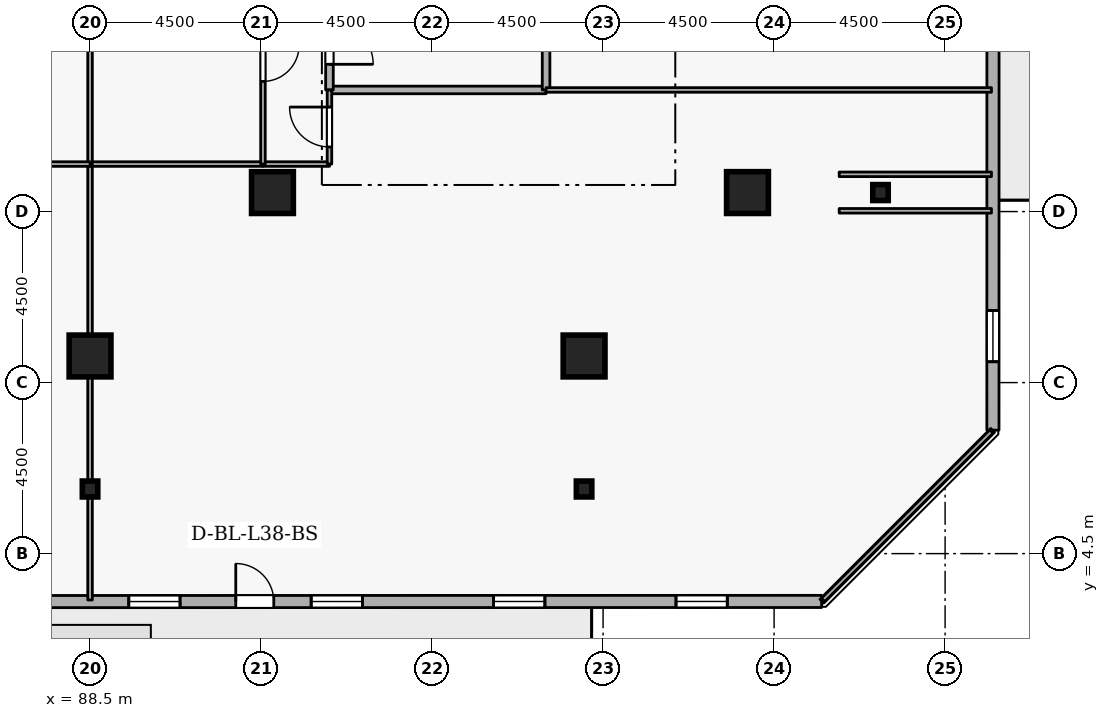
"""IFC4 building model, lengths in metres.
Left out: names, types, materials, properties, quantities, classifications, styles, units other than length and angle.
Written with IfcOpenShell. Run it as: python <this file> out.ifc"""

import sys

from ifc_helpers import new_model, si_unit, direction, frame, frame_2d, origin, origin_2d, place, context, subcontext, project, spatial, rectangle, i_section, extrude, element, fill, save


model = new_model("IFC4")
c1 = context("Model", 3, precision=1e-05, world=origin(), true_north=direction((0.0, 1.0)))
c2 = subcontext(c1, "Body", "Model", "MODEL_VIEW")
j1 = project(units=[si_unit("LENGTHUNIT", "METRE"), si_unit("PLANEANGLEUNIT", "RADIAN")], contexts=[c1])
p1 = place(None, origin())
s1 = spatial("IfcSite", under=j1, at=p1, CompositionType="ELEMENT")
p2 = place(p1, origin())
s2 = spatial("IfcBuilding", under=s1, at=p2, CompositionType="ELEMENT")
p3 = place(p2, frame((0.0, 0.0, 145.5)))
s3 = spatial("IfcBuildingStorey", under=s2, at=p3, CompositionType="ELEMENT", Elevation=145.5)
for number, where, z_axis, x_axis in (
    (1, (105.8, 14.0, 0.0), (0.0, 0.0, 1.0), (1.0, 0.0, 0.0)),
    (2, (101.5, 9.7, 0.0), (0.0, 0.0, 1.0), (1.0, 0.0, 0.0)),
    (3, (88.5, 9.7, 0.0), (0.0, 0.0, 1.0), (1.0, 0.0, 0.0)),
    (4, (93.3, 14.0, 0.0), (0.0, 0.0, 1.0), (1.0, 0.0, 0.0)),
):
    element("IfcColumn", number, at=place(p3, frame(where, z_axis=z_axis, x_axis=x_axis)), inside=s3, PredefinedType="COLUMN", context=c2, shape_type="SweptSolid", body=[
        extrude(rectangle(XDim=1.1, YDim=1.1, at=origin_2d()), origin(), (0.0, 0.0, 1.0), 3.6),
    ])
for number, where, z_axis, x_axis in (
    (5, (109.3, 14.0, 0.0), (0.0, 0.0, 1.0), (1.0, 0.0, 0.0)),
    (6, (101.5, 6.2, 0.0), (0.0, 0.0, 1.0), (1.0, 0.0, 0.0)),
    (7, (88.5, 6.2, 0.0), (0.0, 0.0, 1.0), (1.0, 0.0, 0.0)),
):
    element("IfcColumn", number, at=place(p3, frame(where, z_axis=z_axis, x_axis=x_axis)), inside=s3, PredefinedType="COLUMN", context=c2, shape_type="SweptSolid", body=[
        extrude(i_section(OverallWidth=0.407, OverallDepth=0.419, WebThickness=0.031, FlangeThickness=0.049, FilletRadius=0.015, at=origin_2d()), origin(), (0.0, 0.0, 1.0), 3.6),
    ])
p4 = place(p3, frame((73.319, 3.235, 0.0), z_axis=(0.0, 0.0, 1.0), x_axis=(0.999999983007, 0.000184351399, 0.0)))
e8 = element("IfcWall", 8, at=p4, inside=s3, PredefinedType="STANDARD", context=c2, shape_type="SweptSolid", body=[
    extrude(rectangle(XDim=34.432, YDim=0.32, at=frame_2d((17.216, 0.0))), origin(), (0.0, 0.0, 1.0), 2.22),
])
p5 = place(p4, frame((19.016, 0.0, 0.0)))
e9 = element("IfcOpeningElement", 9, at=p5, cuts=e8, PredefinedType="OPENING", context=c2, shape_type="SweptSolid", body=[
    extrude(rectangle(XDim=1.0, YDim=2.08, at=frame_2d((0.5, 1.04))), frame((0.0, 0.17, 0.0), z_axis=(0.0, -1.0, 0.0), x_axis=(1.0, 0.0, 0.0)), (0.0, 0.0, 1.0), 0.34),
])
p6 = place(p4, frame((1.8, 0.0, 0.72)))
e10 = element("IfcOpeningElement", 10, at=p6, cuts=e8, PredefinedType="OPENING", context=c2, shape_type="SweptSolid", body=[
    extrude(rectangle(XDim=1.35, YDim=1.05, at=frame_2d((0.675, 0.525))), frame((0.0, 0.17, 0.0), z_axis=(0.0, -1.0, 0.0), x_axis=(1.0, 0.0, 0.0)), (0.0, 0.0, 1.0), 0.34),
])
p7 = place(p4, frame((6.6, 0.0, 0.72)))
e11 = element("IfcOpeningElement", 11, at=p7, cuts=e8, PredefinedType="OPENING", context=c2, shape_type="SweptSolid", body=[
    extrude(rectangle(XDim=1.35, YDim=1.05, at=frame_2d((0.675, 0.525))), frame((0.0, 0.17, 0.0), z_axis=(0.0, -1.0, 0.0), x_axis=(1.0, 0.0, 0.0)), (0.0, 0.0, 1.0), 0.34),
])
p8 = place(p4, frame((11.4, 0.0, 0.72)))
e12 = element("IfcOpeningElement", 12, at=p8, cuts=e8, PredefinedType="OPENING", context=c2, shape_type="SweptSolid", body=[
    extrude(rectangle(XDim=1.35, YDim=1.05, at=frame_2d((0.675, 0.525))), frame((0.0, 0.17, 0.0), z_axis=(0.0, -1.0, 0.0), x_axis=(1.0, 0.0, 0.0)), (0.0, 0.0, 1.0), 0.34),
])
p9 = place(p4, frame((16.2, 0.0, 0.72)))
e13 = element("IfcOpeningElement", 13, at=p9, cuts=e8, PredefinedType="OPENING", context=c2, shape_type="SweptSolid", body=[
    extrude(rectangle(XDim=1.35, YDim=1.05, at=frame_2d((0.675, 0.525))), frame((0.0, 0.17, 0.0), z_axis=(0.0, -1.0, 0.0), x_axis=(1.0, 0.0, 0.0)), (0.0, 0.0, 1.0), 0.34),
])
p10 = place(p4, frame((21.0, 0.0, 0.72)))
e14 = element("IfcOpeningElement", 14, at=p10, cuts=e8, PredefinedType="OPENING", context=c2, shape_type="SweptSolid", body=[
    extrude(rectangle(XDim=1.35, YDim=1.05, at=frame_2d((0.675, 0.525))), frame((0.0, 0.17, 0.0), z_axis=(0.0, -1.0, 0.0), x_axis=(1.0, 0.0, 0.0)), (0.0, 0.0, 1.0), 0.34),
])
p11 = place(p4, frame((25.8, 0.0, 0.72)))
e15 = element("IfcOpeningElement", 15, at=p11, cuts=e8, PredefinedType="OPENING", context=c2, shape_type="SweptSolid", body=[
    extrude(rectangle(XDim=1.35, YDim=1.05, at=frame_2d((0.675, 0.525))), frame((0.0, 0.17, 0.0), z_axis=(0.0, -1.0, 0.0), x_axis=(1.0, 0.0, 0.0)), (0.0, 0.0, 1.0), 0.34),
])
p12 = place(p4, frame((30.6, 0.0, 0.72)))
e16 = element("IfcOpeningElement", 16, at=p12, cuts=e8, PredefinedType="OPENING", context=c2, shape_type="SweptSolid", body=[
    extrude(rectangle(XDim=1.35, YDim=1.05, at=frame_2d((0.675, 0.525))), frame((0.0, 0.17, 0.0), z_axis=(0.0, -1.0, 0.0), x_axis=(1.0, 0.0, 0.0)), (0.0, 0.0, 1.0), 0.34),
])
p13 = place(p3, frame((112.258, 7.749, 0.0), z_axis=(0.0, 0.0, 1.0), x_axis=(0.000184351399, 0.999999983007, 0.0)))
e17 = element("IfcWall", 17, at=p13, inside=s3, PredefinedType="STANDARD", context=c2, shape_type="SweptSolid", body=[
    extrude(rectangle(XDim=34.432, YDim=0.32, at=frame_2d((17.216, 0.0))), origin(), (0.0, 0.0, 1.0), 2.22),
])
p14 = place(p13, frame((27.566, 0.0, 0.0)))
e18 = element("IfcOpeningElement", 18, at=p14, cuts=e17, PredefinedType="OPENING", context=c2, shape_type="SweptSolid", body=[
    extrude(rectangle(XDim=1.0, YDim=2.08, at=frame_2d((0.5, 1.04))), frame((0.0, 0.17, 0.0), z_axis=(0.0, -1.0, 0.0), x_axis=(1.0, 0.0, 0.0)), (0.0, 0.0, 1.0), 0.34),
])
p15 = place(p13, frame((1.8, 0.0, 0.72)))
e19 = element("IfcOpeningElement", 19, at=p15, cuts=e17, PredefinedType="OPENING", context=c2, shape_type="SweptSolid", body=[
    extrude(rectangle(XDim=1.35, YDim=1.05, at=frame_2d((0.675, 0.525))), frame((0.0, 0.17, 0.0), z_axis=(0.0, -1.0, 0.0), x_axis=(1.0, 0.0, 0.0)), (0.0, 0.0, 1.0), 0.34),
])
p16 = place(p13, frame((11.4, 0.0, 0.72)))
e20 = element("IfcOpeningElement", 20, at=p16, cuts=e17, PredefinedType="OPENING", context=c2, shape_type="SweptSolid", body=[
    extrude(rectangle(XDim=1.35, YDim=1.05, at=frame_2d((0.675, 0.525))), frame((0.0, 0.17, 0.0), z_axis=(0.0, -1.0, 0.0), x_axis=(1.0, 0.0, 0.0)), (0.0, 0.0, 1.0), 0.34),
])
p17 = place(p13, frame((16.2, 0.0, 0.72)))
e21 = element("IfcOpeningElement", 21, at=p17, cuts=e17, PredefinedType="OPENING", context=c2, shape_type="SweptSolid", body=[
    extrude(rectangle(XDim=1.35, YDim=1.05, at=frame_2d((0.675, 0.525))), frame((0.0, 0.17, 0.0), z_axis=(0.0, -1.0, 0.0), x_axis=(1.0, 0.0, 0.0)), (0.0, 0.0, 1.0), 0.34),
])
p18 = place(p13, frame((21.0, 0.0, 0.72)))
e22 = element("IfcOpeningElement", 22, at=p18, cuts=e17, PredefinedType="OPENING", context=c2, shape_type="SweptSolid", body=[
    extrude(rectangle(XDim=1.35, YDim=1.05, at=frame_2d((0.675, 0.525))), frame((0.0, 0.17, 0.0), z_axis=(0.0, -1.0, 0.0), x_axis=(1.0, 0.0, 0.0)), (0.0, 0.0, 1.0), 0.34),
])
p19 = place(p3, frame((94.8, 16.7, 0.0), z_axis=(0.0, 0.0, 1.0), x_axis=(1.0, 0.0, 0.0)))
e23 = element("IfcWall", 23, at=p19, inside=s3, PredefinedType="STANDARD", context=c2, shape_type="SweptSolid", body=[
    extrude(rectangle(XDim=5.7, YDim=0.2, at=frame_2d((2.85, 0.0))), origin(), (0.0, 0.0, 1.0), 3.3),
])
p20 = place(p3, frame((100.5, 16.7, 0.0), z_axis=(0.0, 0.0, 1.0), x_axis=(0.0, 1.0, 0.0)))
e24 = element("IfcWall", 24, at=p20, inside=s3, PredefinedType="STANDARD", context=c2, shape_type="SweptSolid", body=[
    extrude(rectangle(XDim=2.5, YDim=0.2, at=frame_2d((1.25, 0.0))), origin(), (0.0, 0.0, 1.0), 3.3),
])
p21 = place(p3, frame((94.8, 19.2, 0.0), z_axis=(0.0, 0.0, 1.0), x_axis=(0.0, -1.0, 0.0)))
e25 = element("IfcWall", 25, at=p21, inside=s3, PredefinedType="STANDARD", context=c2, shape_type="SweptSolid", body=[
    extrude(rectangle(XDim=2.5, YDim=0.2, at=frame_2d((1.25, 0.0))), origin(), (0.0, 0.0, 1.0), 3.3),
])
p22 = place(p21, frame((0.675, 0.0, 0.0)))
e26 = element("IfcOpeningElement", 26, at=p22, cuts=e25, PredefinedType="OPENING", context=c2, shape_type="SweptSolid", body=[
    extrude(rectangle(XDim=1.15, YDim=2.1, at=frame_2d((0.575, 1.05))), frame((0.0, 0.11, 0.0), z_axis=(0.0, -1.0, 0.0), x_axis=(1.0, 0.0, 0.0)), (0.0, 0.0, 1.0), 0.22),
])
p23 = place(p3, frame((88.5, 3.28, 0.0), z_axis=(0.0, 0.0, 1.0), x_axis=(0.0, 1.0, 0.0)))
e27 = element("IfcWall", 27, at=p23, inside=s3, PredefinedType="PARTITIONING", context=c2, shape_type="SweptSolid", body=[
    extrude(rectangle(XDim=11.47, YDim=0.12, at=frame_2d((5.735, 0.0))), origin(), (0.0, 0.0, 1.0), 2.842),
])
p24 = place(p3, frame((88.5, 14.75, 0.0), z_axis=(0.0, 0.0, 1.0), x_axis=(1.0, 0.0, 0.0)))
e28 = element("IfcWall", 28, at=p24, inside=s3, PredefinedType="PARTITIONING", context=c2, shape_type="SweptSolid", body=[
    extrude(rectangle(XDim=4.55, YDim=0.12, at=frame_2d((2.275, 0.0))), origin(), (0.0, 0.0, 1.0), 3.3),
])
p25 = place(p3, frame((93.05, 14.75, 0.0), z_axis=(0.0, 0.0, 1.0), x_axis=(1.0, 0.0, 0.0)))
e29 = element("IfcWall", 29, at=p25, inside=s3, PredefinedType="PARTITIONING", context=c2, shape_type="SweptSolid", body=[
    extrude(rectangle(XDim=1.75, YDim=0.12, at=frame_2d((0.875, 0.0))), origin(), (0.0, 0.0, 1.0), 3.3),
])
p26 = place(p3, frame((94.8, 14.75, 0.0), z_axis=(0.0, 0.0, 1.0), x_axis=(0.0, 1.0, 0.0)))
e30 = element("IfcWall", 30, at=p26, inside=s3, PredefinedType="PARTITIONING", context=c2, shape_type="SweptSolid", body=[
    extrude(rectangle(XDim=1.95, YDim=0.12, at=frame_2d((0.975, 0.0))), origin(), (0.0, 0.0, 1.0), 3.3),
])
p27 = place(p26, frame((0.45, 0.0, 0.0)))
e31 = element("IfcOpeningElement", 31, at=p27, cuts=e30, PredefinedType="OPENING", context=c2, shape_type="SweptSolid", body=[
    extrude(rectangle(XDim=1.05, YDim=2.1, at=frame_2d((0.525, 1.05))), frame((0.0, 0.07, 0.0), z_axis=(0.0, -1.0, 0.0), x_axis=(1.0, 0.0, 0.0)), (0.0, 0.0, 1.0), 0.14),
])
p28 = place(p3, frame((100.5, 16.7, 0.0), z_axis=(0.0, 0.0, 1.0), x_axis=(1.0, 0.0, 0.0)))
e32 = element("IfcWall", 32, at=p28, inside=s3, PredefinedType="PARTITIONING", context=c2, shape_type="SweptSolid", body=[
    extrude(rectangle(XDim=11.72, YDim=0.12, at=frame_2d((5.86, 0.0))), origin(), (0.0, 0.0, 1.0), 3.3),
])
for number, where, z_axis, x_axis in (
    (33, (112.22, 14.48, 0.0), (0.0, 0.0, 1.0), (-1.0, 0.0, 0.0)),
    (34, (108.213, 13.52, 0.0), (0.0, 0.0, 1.0), (1.0, 0.0, 0.0)),
):
    element("IfcWall", number, at=place(p3, frame(where, z_axis=z_axis, x_axis=x_axis)), inside=s3, PredefinedType="PARTITIONING", context=c2, shape_type="SweptSolid", body=[
        extrude(rectangle(XDim=4.007, YDim=0.12, at=frame_2d((2.004, 0.0))), origin(), (0.0, 0.0, 1.0), 1.685),
    ])
p29 = place(p3, frame((112.22, 7.713, 0.0), z_axis=(0.0, 0.0, 1.0), x_axis=(-0.707106781187, -0.707106781187, 0.0)))
e35 = element("IfcWall", 35, at=p29, inside=s3, PredefinedType="PARTITIONING", context=c2, shape_type="SweptSolid", body=[
    extrude(rectangle(XDim=6.269, YDim=0.12, at=frame_2d((3.134, 0.0))), origin(), (0.0, 0.0, 1.0), 3.3),
])
p30 = place(p3, frame((88.5, 14.75, 0.0), z_axis=(0.0, 0.0, 1.0), x_axis=(0.0, 1.0, 0.0)))
e36 = element("IfcWall", 36, at=p30, inside=s3, PredefinedType="PARTITIONING", context=c2, shape_type="SweptSolid", body=[
    extrude(rectangle(XDim=5.3, YDim=0.12, at=frame_2d((2.65, 0.0))), origin(), (0.0, 0.0, 1.0), 3.3),
])
p31 = place(p3, frame((93.05, 20.05, 0.0), z_axis=(0.0, 0.0, 1.0), x_axis=(0.0, -1.0, 0.0)))
e37 = element("IfcWall", 37, at=p31, inside=s3, PredefinedType="PARTITIONING", context=c2, shape_type="SweptSolid", body=[
    extrude(rectangle(XDim=5.3, YDim=0.12, at=frame_2d((2.65, 0.0))), origin(), (0.0, 0.0, 1.0), 3.3),
])
p32 = place(p31, frame((2.175, 0.0, 0.0)))
e38 = element("IfcOpeningElement", 38, at=p32, cuts=e37, PredefinedType="OPENING", context=c2, shape_type="SweptSolid", body=[
    extrude(rectangle(XDim=0.95, YDim=2.1, at=frame_2d((0.475, 1.05))), frame((0.0, 0.07, 0.0), z_axis=(0.0, -1.0, 0.0), x_axis=(1.0, 0.0, 0.0)), (0.0, 0.0, 1.0), 0.14),
])
p33 = place(p3, frame((88.5, 14.75, 0.0), z_axis=(0.0, 0.0, 1.0), x_axis=(-1.0, 0.0, 0.0)))
e39 = element("IfcWall", 39, at=p33, inside=s3, PredefinedType="PARTITIONING", context=c2, shape_type="SweptSolid", body=[
    extrude(rectangle(XDim=2.3, YDim=0.12, at=frame_2d((1.15, 0.0))), origin(), (0.0, 0.0, 1.0), 3.3),
])
p34 = place(p5, origin())
e40 = element("IfcDoor", 40, at=p34, inside=s3, OperationType="SINGLE_SWING_LEFT", PredefinedType="DOOR", context=c2, shape_type="SweptSolid", body=[
    extrude(rectangle(XDim=1.0, YDim=2.08, at=frame_2d((0.5, 1.04))), frame((0.0, 0.025, 0.0), z_axis=(0.0, -1.0, 0.0), x_axis=(1.0, 0.0, 0.0)), (0.0, 0.0, 1.0), 0.05),
])
fill(e9, e40)
p35 = place(p9, origin())
e41 = element("IfcWindow", 41, at=p35, inside=s3, PartitioningType="SINGLE_PANEL", PredefinedType="WINDOW", context=c2, shape_type="SweptSolid", body=[
    extrude(rectangle(XDim=1.35, YDim=1.05, at=frame_2d((0.675, 0.525))), frame((0.0, 0.03, 0.0), z_axis=(0.0, -1.0, 0.0), x_axis=(1.0, 0.0, 0.0)), (0.0, 0.0, 1.0), 0.06),
])
fill(e13, e41)
p36 = place(p10, origin())
e42 = element("IfcWindow", 42, at=p36, inside=s3, PartitioningType="SINGLE_PANEL", PredefinedType="WINDOW", context=c2, shape_type="SweptSolid", body=[
    extrude(rectangle(XDim=1.35, YDim=1.05, at=frame_2d((0.675, 0.525))), frame((0.0, 0.03, 0.0), z_axis=(0.0, -1.0, 0.0), x_axis=(1.0, 0.0, 0.0)), (0.0, 0.0, 1.0), 0.06),
])
fill(e14, e42)
p37 = place(p11, origin())
e43 = element("IfcWindow", 43, at=p37, inside=s3, PartitioningType="SINGLE_PANEL", PredefinedType="WINDOW", context=c2, shape_type="SweptSolid", body=[
    extrude(rectangle(XDim=1.35, YDim=1.05, at=frame_2d((0.675, 0.525))), frame((0.0, 0.03, 0.0), z_axis=(0.0, -1.0, 0.0), x_axis=(1.0, 0.0, 0.0)), (0.0, 0.0, 1.0), 0.06),
])
fill(e15, e43)
p38 = place(p12, origin())
e44 = element("IfcWindow", 44, at=p38, inside=s3, PartitioningType="SINGLE_PANEL", PredefinedType="WINDOW", context=c2, shape_type="SweptSolid", body=[
    extrude(rectangle(XDim=1.35, YDim=1.05, at=frame_2d((0.675, 0.525))), frame((0.0, 0.03, 0.0), z_axis=(0.0, -1.0, 0.0), x_axis=(1.0, 0.0, 0.0)), (0.0, 0.0, 1.0), 0.06),
])
fill(e16, e44)
p39 = place(p15, origin())
e45 = element("IfcWindow", 45, at=p39, inside=s3, PartitioningType="SINGLE_PANEL", PredefinedType="WINDOW", context=c2, shape_type="SweptSolid", body=[
    extrude(rectangle(XDim=1.35, YDim=1.05, at=frame_2d((0.675, 0.525))), frame((0.0, 0.03, 0.0), z_axis=(0.0, -1.0, 0.0), x_axis=(1.0, 0.0, 0.0)), (0.0, 0.0, 1.0), 0.06),
])
fill(e19, e45)
p40 = place(p22, origin())
e46 = element("IfcDoor", 46, at=p40, inside=s3, OperationType="SINGLE_SWING_RIGHT", PredefinedType="DOOR", context=c2, shape_type="SweptSolid", body=[
    extrude(rectangle(XDim=1.15, YDim=2.1, at=frame_2d((0.575, 1.05))), frame((0.0, 0.025, 0.0), z_axis=(0.0, -1.0, 0.0), x_axis=(1.0, 0.0, 0.0)), (0.0, 0.0, 1.0), 0.05),
])
fill(e26, e46)
p41 = place(p27, origin())
e47 = element("IfcDoor", 47, at=p41, inside=s3, OperationType="SINGLE_SWING_RIGHT", PredefinedType="DOOR", context=c2, shape_type="SweptSolid", body=[
    extrude(rectangle(XDim=1.05, YDim=2.1, at=frame_2d((0.525, 1.05))), frame((0.0, 0.025, 0.0), z_axis=(0.0, -1.0, 0.0), x_axis=(1.0, 0.0, 0.0)), (0.0, 0.0, 1.0), 0.05),
])
fill(e31, e47)
p42 = place(p32, origin())
e48 = element("IfcDoor", 48, at=p42, inside=s3, OperationType="SINGLE_SWING_LEFT", PredefinedType="DOOR", context=c2, shape_type="SweptSolid", body=[
    extrude(rectangle(XDim=0.95, YDim=2.1, at=frame_2d((0.475, 1.05))), frame((0.0, 0.025, 0.0), z_axis=(0.0, -1.0, 0.0), x_axis=(1.0, 0.0, 0.0)), (0.0, 0.0, 1.0), 0.05),
])
fill(e38, e48)
save(model, sys.argv[1])
